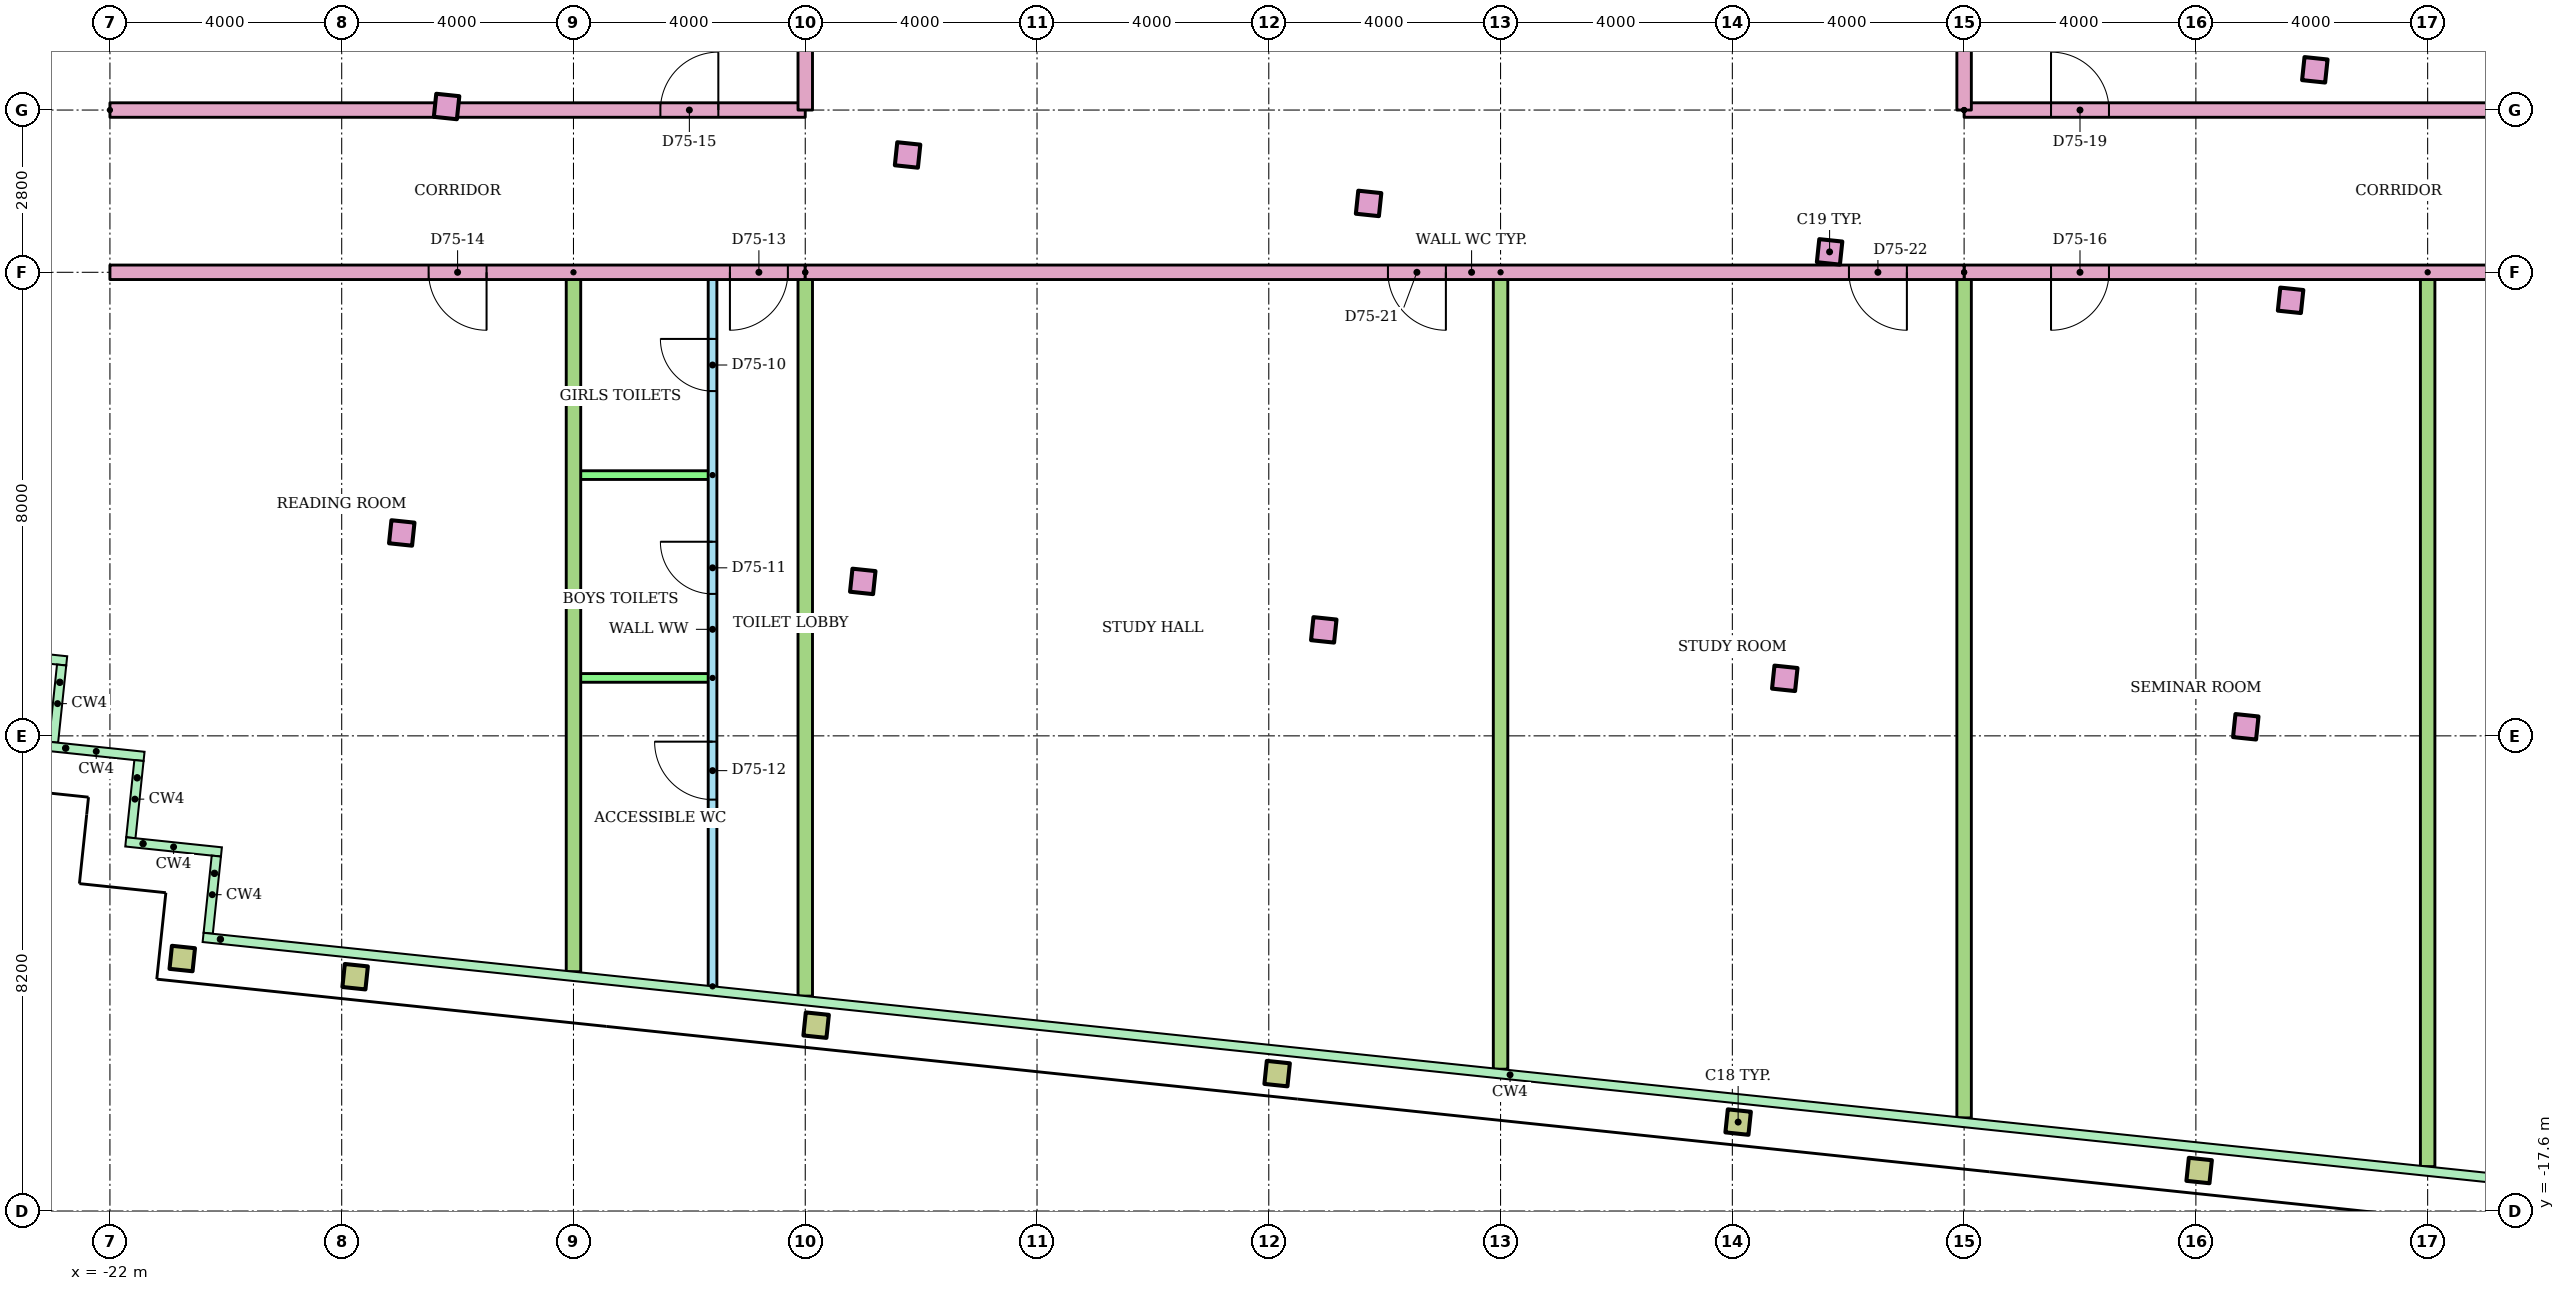
"""IFC4 building model, lengths in metres.
Left out: names, types, materials, properties, quantities, classifications, styles, units other than length and angle.
Written with IfcOpenShell. Run it as: python <this file> out.ifc"""

import sys

from ifc_helpers import new_model, si_unit, direction, frame, frame_2d, origin, origin_2d, place, context, subcontext, project, spatial, rectangle, hollow_rectangle, extrude, element, fill, save


model = new_model("IFC4")
c1 = context("Model", 3, precision=1e-05, world=origin(), true_north=direction((0.0, 1.0)))
c2 = subcontext(c1, "Body", "Model", "MODEL_VIEW")
j1 = project(units=[si_unit("LENGTHUNIT", "METRE"), si_unit("PLANEANGLEUNIT", "RADIAN")], contexts=[c1])
p1 = place(None, origin())
s1 = spatial("IfcSite", under=j1, at=p1, CompositionType="ELEMENT")
p2 = place(p1, origin())
s2 = spatial("IfcBuilding", under=s1, at=p2, CompositionType="ELEMENT")
p3 = place(p2, frame((0.0, 0.0, 291.5)))
s3 = spatial("IfcBuildingStorey", under=s2, at=p3, CompositionType="ELEMENT", Elevation=291.5)
for number, where, z_axis, x_axis in (
    (1, (-20.752, -13.243, 0.0), (0.0, 0.0, 1.0), (0.995, -0.105, 0.0)),
    (2, (-17.768, -13.556, 0.0), (0.0, 0.0, 1.0), (0.995, -0.105, 0.0)),
    (3, (-9.812, -14.392, 0.0), (0.0, 0.0, 1.0), (0.995, -0.105, 0.0)),
    (4, (-1.856, -15.229, 0.0), (0.0, 0.0, 1.0), (0.995, -0.105, 0.0)),
    (5, (6.1, -16.065, 0.0), (0.0, 0.0, 1.0), (0.995, -0.105, 0.0)),
    (6, (14.056, -16.901, 0.0), (0.0, 0.0, 1.0), (0.995, -0.105, 0.0)),
):
    element("IfcColumn", number, at=place(p3, frame(where, z_axis=z_axis, x_axis=x_axis)), inside=s3, PredefinedType="COLUMN", context=c2, shape_type="SweptSolid", body=[
        extrude(hollow_rectangle(XDim=0.4, YDim=0.4, WallThickness=0.02, at=origin_2d()), origin(), (0.0, 0.0, 1.0), 3.4),
    ])
for number, where, z_axis, x_axis in (
    (7, (-16.964, -5.898, 0.0), (0.0, 0.0, 1.0), (0.995, -0.105, 0.0)),
    (8, (-9.007, -6.735, 0.0), (0.0, 0.0, 1.0), (0.995, -0.105, 0.0)),
    (9, (-1.051, -7.571, 0.0), (0.0, 0.0, 1.0), (0.995, -0.105, 0.0)),
    (10, (6.905, -8.407, 0.0), (0.0, 0.0, 1.0), (0.995, -0.105, 0.0)),
    (11, (14.861, -9.243, 0.0), (0.0, 0.0, 1.0), (0.995, -0.105, 0.0)),
    (12, (-16.19, 1.461, 0.0), (0.0, 0.0, 1.0), (0.995, -0.105, 0.0)),
    (13, (-8.234, 0.625, 0.0), (0.0, 0.0, 1.0), (0.995, -0.105, 0.0)),
    (14, (-0.278, -0.211, 0.0), (0.0, 0.0, 1.0), (0.995, -0.105, 0.0)),
    (15, (7.678, -1.048, 0.0), (0.0, 0.0, 1.0), (0.995, -0.105, 0.0)),
    (16, (15.635, -1.884, 0.0), (0.0, 0.0, 1.0), (0.995, -0.105, 0.0)),
    (17, (16.053, 2.094, 0.0), (0.0, 0.0, 1.0), (0.995, -0.105, 0.0)),
):
    element("IfcColumn", number, at=place(p3, frame(where, z_axis=z_axis, x_axis=x_axis)), inside=s3, PredefinedType="COLUMN", context=c2, shape_type="SweptSolid", body=[
        extrude(rectangle(XDim=0.4, YDim=0.4, at=origin_2d()), origin(), (0.0, 0.0, 1.0), 3.4),
    ])
p4 = place(p3, frame((-10.0, -1.4, 0.0), z_axis=(0.0, 0.0, 1.0), x_axis=(-1.0, 0.0, 0.0)))
e18 = element("IfcWall", 18, at=p4, inside=s3, PredefinedType="PARTITIONING", context=c2, shape_type="SweptSolid", body=[
    extrude(rectangle(XDim=12.0, YDim=0.25, at=frame_2d((6.0, 0.0))), origin(), (0.0, 0.0, 1.0), 2.6),
])
p5 = place(p4, frame((0.3, 0.0, 0.0)))
e19 = element("IfcOpeningElement", 19, at=p5, cuts=e18, PredefinedType="OPENING", context=c2, shape_type="SweptSolid", body=[
    extrude(rectangle(XDim=1.0, YDim=2.1, at=frame_2d((0.5, 1.05))), frame((0.0, 0.135, 0.0), z_axis=(0.0, -1.0, 0.0), x_axis=(1.0, 0.0, 0.0)), (0.0, 0.0, 1.0), 0.27),
])
p6 = place(p4, frame((5.5, 0.0, 0.0)))
e20 = element("IfcOpeningElement", 20, at=p6, cuts=e18, PredefinedType="OPENING", context=c2, shape_type="SweptSolid", body=[
    extrude(rectangle(XDim=1.0, YDim=2.1, at=frame_2d((0.5, 1.05))), frame((0.0, 0.135, 0.0), z_axis=(0.0, -1.0, 0.0), x_axis=(1.0, 0.0, 0.0)), (0.0, 0.0, 1.0), 0.27),
])
p7 = place(p3, frame((-11.6, -13.723, 0.0), z_axis=(0.0, 0.0, 1.0), x_axis=(0.0, 1.0, 0.0)))
e21 = element("IfcWall", 21, at=p7, inside=s3, PredefinedType="PARTITIONING", context=c2, shape_type="SweptSolid", body=[
    extrude(rectangle(XDim=12.323, YDim=0.15, at=frame_2d((6.162, 0.0))), origin(), (0.0, 0.0, 1.0), 2.6),
])
p8 = place(p7, frame((10.273, 0.0, 0.0)))
e22 = element("IfcOpeningElement", 22, at=p8, cuts=e21, PredefinedType="OPENING", context=c2, shape_type="SweptSolid", body=[
    extrude(rectangle(XDim=0.9, YDim=2.1, at=frame_2d((0.45, 1.05))), frame((0.0, 0.085, 0.0), z_axis=(0.0, -1.0, 0.0), x_axis=(1.0, 0.0, 0.0)), (0.0, 0.0, 1.0), 0.17),
])
p9 = place(p7, frame((6.773, 0.0, 0.0)))
e23 = element("IfcOpeningElement", 23, at=p9, cuts=e21, PredefinedType="OPENING", context=c2, shape_type="SweptSolid", body=[
    extrude(rectangle(XDim=0.9, YDim=2.1, at=frame_2d((0.45, 1.05))), frame((0.0, 0.085, 0.0), z_axis=(0.0, -1.0, 0.0), x_axis=(1.0, 0.0, 0.0)), (0.0, 0.0, 1.0), 0.17),
])
p10 = place(p7, frame((3.223, 0.0, 0.0)))
e24 = element("IfcOpeningElement", 24, at=p10, cuts=e21, PredefinedType="OPENING", context=c2, shape_type="SweptSolid", body=[
    extrude(rectangle(XDim=1.0, YDim=2.1, at=frame_2d((0.5, 1.05))), frame((0.0, 0.085, 0.0), z_axis=(0.0, -1.0, 0.0), x_axis=(1.0, 0.0, 0.0)), (0.0, 0.0, 1.0), 0.17),
])
for number, where, z_axis, x_axis in (
    (25, (-11.6, -4.9, 0.0), (0.0, 0.0, 1.0), (-1.0, 0.0, 0.0)),
    (26, (-11.6, -8.4, 0.0), (0.0, 0.0, 1.0), (-1.0, 0.0, 0.0)),
):
    element("IfcWall", number, at=place(p3, frame(where, z_axis=z_axis, x_axis=x_axis)), inside=s3, PredefinedType="PARTITIONING", context=c2, shape_type="SweptSolid", body=[
        extrude(rectangle(XDim=2.4, YDim=0.15, at=frame_2d((1.2, 0.0))), origin(), (0.0, 0.0, 1.0), 2.6),
    ])
p11 = place(p3, frame((-14.0, -1.4, 0.0), z_axis=(0.0, 0.0, 1.0), x_axis=(0.0, -1.0, 0.0)))
e27 = element("IfcWall", 27, at=p11, inside=s3, PredefinedType="PARTITIONING", context=c2, shape_type="SweptSolid", body=[
    extrude(rectangle(XDim=12.071, YDim=0.25, at=frame_2d((6.035, 0.0))), origin(), (0.0, 0.0, 1.0), 2.6),
])
p12 = place(p3, frame((-10.0, -1.4, 0.0), z_axis=(0.0, 0.0, 1.0), x_axis=(0.0, -1.0, 0.0)))
e28 = element("IfcWall", 28, at=p12, inside=s3, PredefinedType="PARTITIONING", context=c2, shape_type="SweptSolid", body=[
    extrude(rectangle(XDim=12.491, YDim=0.25, at=frame_2d((6.246, 0.0))), origin(), (0.0, 0.0, 1.0), 2.6),
])
p13 = place(p3, frame((-22.0, 1.4, 0.0)))
e29 = element("IfcWall", 29, at=p13, inside=s3, PredefinedType="PARTITIONING", context=c2, shape_type="SweptSolid", body=[
    extrude(rectangle(XDim=12.0, YDim=0.25, at=frame_2d((6.0, 0.0))), origin(), (0.0, 0.0, 1.0), 2.6),
])
p14 = place(p13, frame((9.5, 0.0, 0.0)))
e30 = element("IfcOpeningElement", 30, at=p14, cuts=e29, PredefinedType="OPENING", context=c2, shape_type="SweptSolid", body=[
    extrude(rectangle(XDim=1.0, YDim=2.1, at=frame_2d((0.5, 1.05))), frame((0.0, 0.135, 0.0), z_axis=(0.0, -1.0, 0.0), x_axis=(1.0, 0.0, 0.0)), (0.0, 0.0, 1.0), 0.27),
])
p15 = place(p3, frame((25.0, -1.4, 0.0), z_axis=(0.0, 0.0, 1.0), x_axis=(-1.0, 0.0, 0.0)))
e31 = element("IfcWall", 31, at=p15, inside=s3, PredefinedType="PARTITIONING", context=c2, shape_type="SweptSolid", body=[
    extrude(rectangle(XDim=15.0, YDim=0.25, at=frame_2d((7.5, 0.0))), origin(), (0.0, 0.0, 1.0), 2.6),
])
p16 = place(p15, frame((12.5, 0.0, 0.0)))
e32 = element("IfcOpeningElement", 32, at=p16, cuts=e31, PredefinedType="OPENING", context=c2, shape_type="SweptSolid", body=[
    extrude(rectangle(XDim=1.0, YDim=2.1, at=frame_2d((0.5, 1.05))), frame((0.0, 0.135, 0.0), z_axis=(0.0, -1.0, 0.0), x_axis=(1.0, 0.0, 0.0)), (0.0, 0.0, 1.0), 0.27),
])
p17 = place(p15, frame((4.5, 0.0, 0.0)))
e33 = element("IfcOpeningElement", 33, at=p17, cuts=e31, PredefinedType="OPENING", context=c2, shape_type="SweptSolid", body=[
    extrude(rectangle(XDim=1.0, YDim=2.1, at=frame_2d((0.5, 1.05))), frame((0.0, 0.135, 0.0), z_axis=(0.0, -1.0, 0.0), x_axis=(1.0, 0.0, 0.0)), (0.0, 0.0, 1.0), 0.27),
])
p18 = place(p3, frame((10.0, -1.4, 0.0), z_axis=(0.0, 0.0, 1.0), x_axis=(0.0, -1.0, 0.0)))
e34 = element("IfcWall", 34, at=p18, inside=s3, PredefinedType="PARTITIONING", context=c2, shape_type="SweptSolid", body=[
    extrude(rectangle(XDim=14.593, YDim=0.25, at=frame_2d((7.297, 0.0))), origin(), (0.0, 0.0, 1.0), 2.6),
])
p19 = place(p3, frame((18.0, -1.4, 0.0), z_axis=(0.0, 0.0, 1.0), x_axis=(0.0, -1.0, 0.0)))
e35 = element("IfcWall", 35, at=p19, inside=s3, PredefinedType="PARTITIONING", context=c2, shape_type="SweptSolid", body=[
    extrude(rectangle(XDim=15.434, YDim=0.25, at=frame_2d((7.717, 0.0))), origin(), (0.0, 0.0, 1.0), 2.6),
])
p20 = place(p3, frame((10.0, 1.4, 0.0)))
e36 = element("IfcWall", 36, at=p20, inside=s3, PredefinedType="PARTITIONING", context=c2, shape_type="SweptSolid", body=[
    extrude(rectangle(XDim=15.0, YDim=0.25, at=frame_2d((7.5, 0.0))), origin(), (0.0, 0.0, 1.0), 2.6),
])
p21 = place(p20, frame((1.5, 0.0, 0.0)))
e37 = element("IfcOpeningElement", 37, at=p21, cuts=e36, PredefinedType="OPENING", context=c2, shape_type="SweptSolid", body=[
    extrude(rectangle(XDim=1.0, YDim=2.1, at=frame_2d((0.5, 1.05))), frame((0.0, 0.135, 0.0), z_axis=(0.0, -1.0, 0.0), x_axis=(1.0, 0.0, 0.0)), (0.0, 0.0, 1.0), 0.27),
])
p22 = place(p20, frame((12.675, 0.0, 0.0)))
e38 = element("IfcOpeningElement", 38, at=p22, cuts=e36, PredefinedType="OPENING", context=c2, shape_type="SweptSolid", body=[
    extrude(rectangle(XDim=1.0, YDim=2.1, at=frame_2d((0.5, 1.05))), frame((0.0, 0.135, 0.0), z_axis=(0.0, -1.0, 0.0), x_axis=(1.0, 0.0, 0.0)), (0.0, 0.0, 1.0), 0.27),
])
p23 = place(p3, frame((2.0, -1.4, 0.0), z_axis=(0.0, 0.0, 1.0), x_axis=(0.0, -1.0, 0.0)))
e39 = element("IfcWall", 39, at=p23, inside=s3, PredefinedType="PARTITIONING", context=c2, shape_type="SweptSolid", body=[
    extrude(rectangle(XDim=13.752, YDim=0.25, at=frame_2d((6.876, 0.0))), origin(), (0.0, 0.0, 1.0), 2.6),
])
p24 = place(p3, frame((10.0, -1.4, 0.0), z_axis=(0.0, 0.0, 1.0), x_axis=(-1.0, 0.0, 0.0)))
e40 = element("IfcWall", 40, at=p24, inside=s3, PredefinedType="PARTITIONING", context=c2, shape_type="SweptSolid", body=[
    extrude(rectangle(XDim=20.0, YDim=0.25, at=frame_2d((10.0, 0.0))), origin(), (0.0, 0.0, 1.0), 2.6),
])
p25 = place(p24, frame((8.944, 0.0, 0.0)))
e41 = element("IfcOpeningElement", 41, at=p25, cuts=e40, PredefinedType="OPENING", context=c2, shape_type="SweptSolid", body=[
    extrude(rectangle(XDim=1.0, YDim=2.1, at=frame_2d((0.5, 1.05))), frame((0.0, 0.135, 0.0), z_axis=(0.0, -1.0, 0.0), x_axis=(1.0, 0.0, 0.0)), (0.0, 0.0, 1.0), 0.27),
])
p26 = place(p24, frame((0.988, 0.0, 0.0)))
e42 = element("IfcOpeningElement", 42, at=p26, cuts=e40, PredefinedType="OPENING", context=c2, shape_type="SweptSolid", body=[
    extrude(rectangle(XDim=1.0, YDim=2.1, at=frame_2d((0.5, 1.05))), frame((0.0, 0.135, 0.0), z_axis=(0.0, -1.0, 0.0), x_axis=(1.0, 0.0, 0.0)), (0.0, 0.0, 1.0), 0.27),
])
for number, where, z_axis, x_axis in (
    (43, (-10.0, 3.0, 0.0), (0.0, 0.0, 1.0), (0.0, -1.0, 0.0)),
    (44, (10.0, 1.4, 0.0), (0.0, 0.0, 1.0), (0.0, 1.0, 0.0)),
):
    element("IfcWall", number, at=place(p3, frame(where, z_axis=z_axis, x_axis=x_axis)), inside=s3, PredefinedType="PARTITIONING", context=c2, shape_type="SweptSolid", body=[
        extrude(rectangle(XDim=1.6, YDim=0.25, at=frame_2d((0.8, 0.0))), origin(), (0.0, 0.0, 1.0), 2.6),
    ])
p27 = place(p8, origin())
e45 = element("IfcDoor", 45, at=p27, inside=s3, OperationType="SINGLE_SWING_RIGHT", PredefinedType="DOOR", context=c2, shape_type="SweptSolid", body=[
    extrude(rectangle(XDim=0.9, YDim=2.1, at=frame_2d((0.45, 1.05))), frame((0.0, 0.025, 0.0), z_axis=(0.0, -1.0, 0.0), x_axis=(1.0, 0.0, 0.0)), (0.0, 0.0, 1.0), 0.05),
])
fill(e22, e45)
p28 = place(p9, origin())
e46 = element("IfcDoor", 46, at=p28, inside=s3, OperationType="SINGLE_SWING_RIGHT", PredefinedType="DOOR", context=c2, shape_type="SweptSolid", body=[
    extrude(rectangle(XDim=0.9, YDim=2.1, at=frame_2d((0.45, 1.05))), frame((0.0, 0.025, 0.0), z_axis=(0.0, -1.0, 0.0), x_axis=(1.0, 0.0, 0.0)), (0.0, 0.0, 1.0), 0.05),
])
fill(e23, e46)
p29 = place(p10, origin())
e47 = element("IfcDoor", 47, at=p29, inside=s3, OperationType="SINGLE_SWING_RIGHT", PredefinedType="DOOR", context=c2, shape_type="SweptSolid", body=[
    extrude(rectangle(XDim=1.0, YDim=2.1, at=frame_2d((0.5, 1.05))), frame((0.0, 0.025, 0.0), z_axis=(0.0, -1.0, 0.0), x_axis=(1.0, 0.0, 0.0)), (0.0, 0.0, 1.0), 0.05),
])
fill(e24, e47)
p30 = place(p5, origin())
e48 = element("IfcDoor", 48, at=p30, inside=s3, OperationType="SINGLE_SWING_RIGHT", PredefinedType="DOOR", context=c2, shape_type="SweptSolid", body=[
    extrude(rectangle(XDim=1.0, YDim=2.1, at=frame_2d((0.5, 1.05))), frame((0.0, 0.025, 0.0), z_axis=(0.0, -1.0, 0.0), x_axis=(1.0, 0.0, 0.0)), (0.0, 0.0, 1.0), 0.05),
])
fill(e19, e48)
p31 = place(p6, origin())
e49 = element("IfcDoor", 49, at=p31, inside=s3, OperationType="SINGLE_SWING_LEFT", PredefinedType="DOOR", context=c2, shape_type="SweptSolid", body=[
    extrude(rectangle(XDim=1.0, YDim=2.1, at=frame_2d((0.5, 1.05))), frame((0.0, 0.025, 0.0), z_axis=(0.0, -1.0, 0.0), x_axis=(1.0, 0.0, 0.0)), (0.0, 0.0, 1.0), 0.05),
])
fill(e20, e49)
p32 = place(p14, origin())
e50 = element("IfcDoor", 50, at=p32, inside=s3, OperationType="SINGLE_SWING_RIGHT", PredefinedType="DOOR", context=c2, shape_type="SweptSolid", body=[
    extrude(rectangle(XDim=1.0, YDim=2.1, at=frame_2d((0.5, 1.05))), frame((0.0, 0.025, 0.0), z_axis=(0.0, -1.0, 0.0), x_axis=(1.0, 0.0, 0.0)), (0.0, 0.0, 1.0), 0.05),
])
fill(e30, e50)
p33 = place(p16, origin())
e51 = element("IfcDoor", 51, at=p33, inside=s3, OperationType="SINGLE_SWING_RIGHT", PredefinedType="DOOR", context=c2, shape_type="SweptSolid", body=[
    extrude(rectangle(XDim=1.0, YDim=2.1, at=frame_2d((0.5, 1.05))), frame((0.0, 0.025, 0.0), z_axis=(0.0, -1.0, 0.0), x_axis=(1.0, 0.0, 0.0)), (0.0, 0.0, 1.0), 0.05),
])
fill(e32, e51)
p34 = place(p21, origin())
e52 = element("IfcDoor", 52, at=p34, inside=s3, OperationType="SINGLE_SWING_LEFT", PredefinedType="DOOR", context=c2, shape_type="SweptSolid", body=[
    extrude(rectangle(XDim=1.0, YDim=2.1, at=frame_2d((0.5, 1.05))), frame((0.0, 0.025, 0.0), z_axis=(0.0, -1.0, 0.0), x_axis=(1.0, 0.0, 0.0)), (0.0, 0.0, 1.0), 0.05),
])
fill(e37, e52)
p35 = place(p25, origin())
e53 = element("IfcDoor", 53, at=p35, inside=s3, OperationType="SINGLE_SWING_LEFT", PredefinedType="DOOR", context=c2, shape_type="SweptSolid", body=[
    extrude(rectangle(XDim=1.0, YDim=2.1, at=frame_2d((0.5, 1.05))), frame((0.0, 0.025, 0.0), z_axis=(0.0, -1.0, 0.0), x_axis=(1.0, 0.0, 0.0)), (0.0, 0.0, 1.0), 0.05),
])
fill(e41, e53)
p36 = place(p26, origin())
e54 = element("IfcDoor", 54, at=p36, inside=s3, OperationType="SINGLE_SWING_LEFT", PredefinedType="DOOR", context=c2, shape_type="SweptSolid", body=[
    extrude(rectangle(XDim=1.0, YDim=2.1, at=frame_2d((0.5, 1.05))), frame((0.0, 0.025, 0.0), z_axis=(0.0, -1.0, 0.0), x_axis=(1.0, 0.0, 0.0)), (0.0, 0.0, 1.0), 0.05),
])
fill(e42, e54)
save(model, sys.argv[1])
